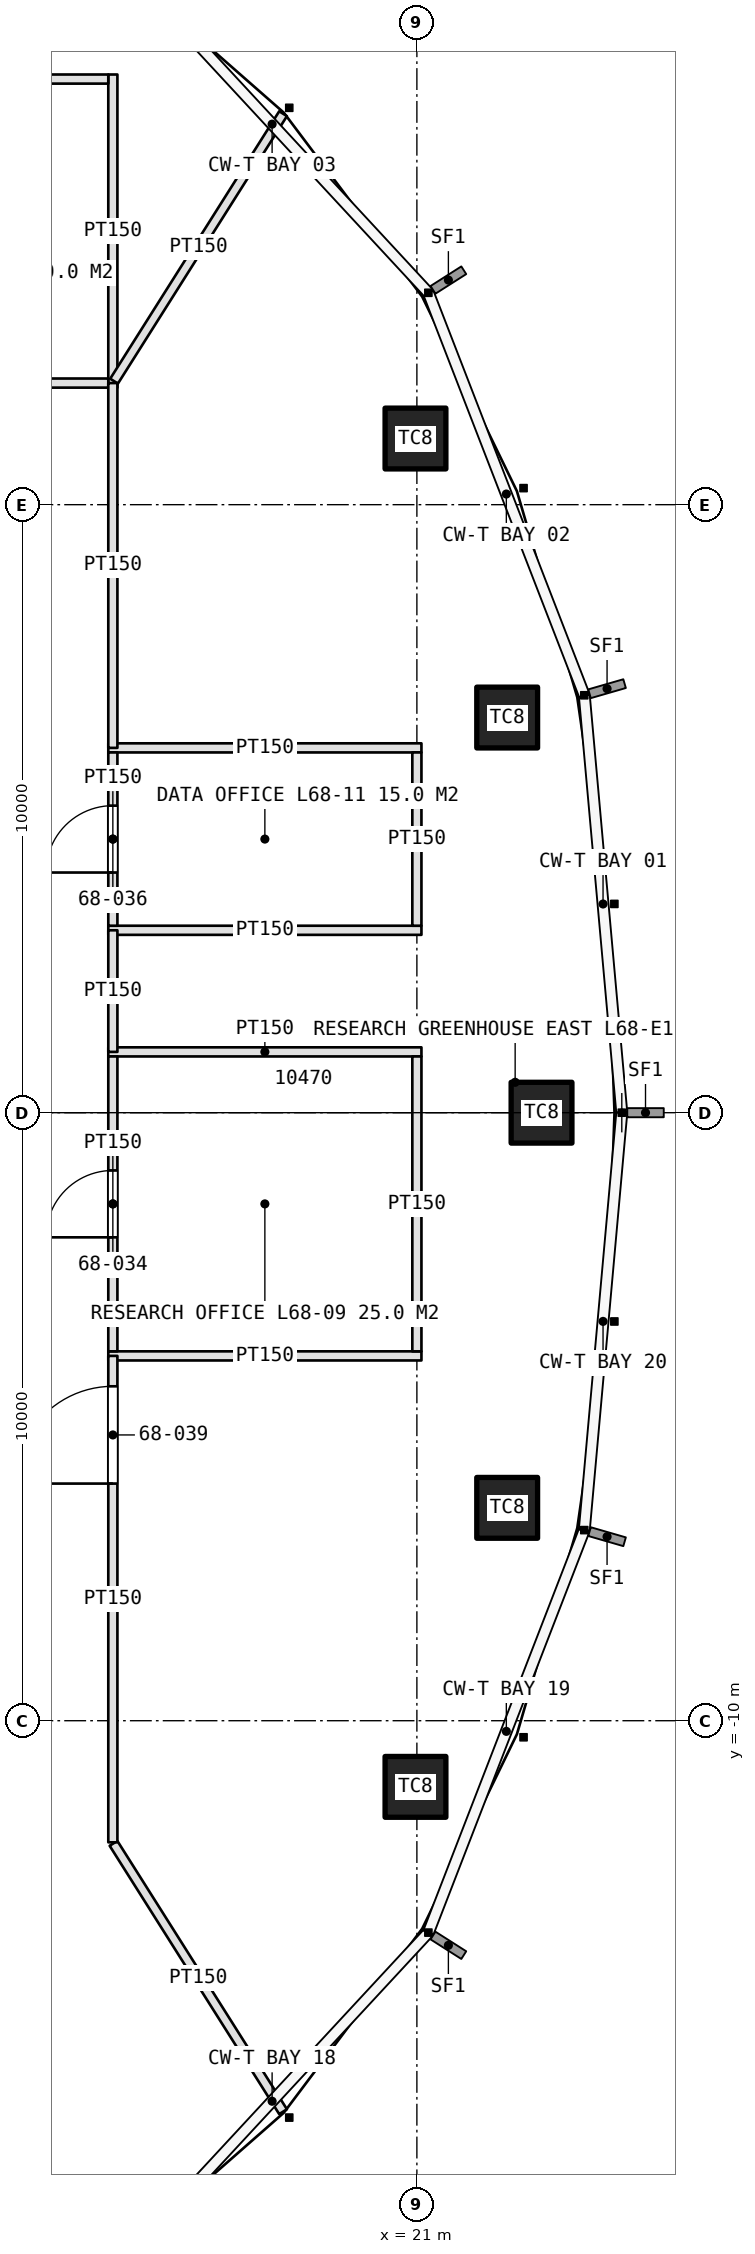
"""IFC4 building model, lengths in metres.
Left out: names, types, materials, properties, quantities, classifications, styles, units other than length and angle.
Written with IfcOpenShell. Run it as: python <this file> out.ifc"""

import sys

from ifc_helpers import new_model, si_unit, direction, frame, frame_2d, origin, origin_2d, place, context, subcontext, project, spatial, rectangle, extrude, element, fill, save


model = new_model("IFC4")
c1 = context("Model", 3, precision=1e-05, world=origin(), true_north=direction((0.0, 1.0)))
c2 = subcontext(c1, "Body", "Model", "MODEL_VIEW")
j1 = project(units=[si_unit("LENGTHUNIT", "METRE"), si_unit("PLANEANGLEUNIT", "RADIAN")], contexts=[c1])
p1 = place(None, origin())
s1 = spatial("IfcSite", under=j1, at=p1, CompositionType="ELEMENT")
p2 = place(p1, origin())
s2 = spatial("IfcBuilding", under=s1, at=p2, CompositionType="ELEMENT")
p3 = place(p2, frame((0.0, 0.0, 304.8)))
s3 = spatial("IfcBuildingStorey", under=s2, at=p3, CompositionType="ELEMENT", Elevation=304.8)
for number, where, z_axis, x_axis in (
    (1, (23.05, 0.0, 0.0), (0.0, 0.0, 1.0), (1.0, 0.0, 0.0)),
    (2, (22.485, 6.499, 0.0), (0.0, 0.0, 1.0), (1.0, 0.0, 0.0)),
    (3, (20.977, 11.088, 0.0), (0.0, 0.0, 1.0), (1.0, 0.0, 0.0)),
    (4, (20.977, -11.088, 0.0), (0.0, 0.0, 1.0), (1.0, 0.0, 0.0)),
    (5, (22.485, -6.499, 0.0), (0.0, 0.0, 1.0), (1.0, 0.0, 0.0)),
):
    element("IfcColumn", number, at=place(p3, frame(where, z_axis=z_axis, x_axis=x_axis)), inside=s3, PredefinedType="COLUMN", context=c2, shape_type="SweptSolid", body=[
        extrude(rectangle(XDim=1.0, YDim=1.0, at=origin_2d()), origin(), (0.0, 0.0, 1.0), 4.2),
    ])
p4 = place(p3, frame((16.0, 11.925, 0.0), z_axis=(0.0, 0.0, 1.0), x_axis=(0.0, 1.0, 0.0)))
e6 = element("IfcWall", 6, at=p4, inside=s3, PredefinedType="PARTITIONING", context=c2, shape_type="SweptSolid", body=[
    extrude(rectangle(XDim=5.15, YDim=0.15, at=frame_2d((2.575, 0.0))), origin(), (0.0, 0.0, 1.0), 3.0),
])
p5 = place(p3, frame((12.1, 12.0, 0.0), z_axis=(0.0, 0.0, 1.0), x_axis=(1.0, 0.0, 0.0)))
e7 = element("IfcWall", 7, at=p5, inside=s3, PredefinedType="PARTITIONING", context=c2, shape_type="SweptSolid", body=[
    extrude(rectangle(XDim=3.825, YDim=0.15, at=frame_2d((1.913, 0.0))), origin(), (0.0, 0.0, 1.0), 3.0),
])
p6 = place(p5, frame((1.363, 0.0, 0.0)))
e8 = element("IfcOpeningElement", 8, at=p6, cuts=e7, PredefinedType="OPENING", context=c2, shape_type="SweptSolid", body=[
    extrude(rectangle(XDim=1.1, YDim=2.3, at=frame_2d((0.55, 1.15))), frame((0.0, 0.085, 0.0), z_axis=(0.0, -1.0, 0.0), x_axis=(1.0, 0.0, 0.0)), (0.0, 0.0, 1.0), 0.17),
])
p7 = place(p3, frame((12.1, 17.0, 0.0), z_axis=(0.0, 0.0, 1.0), x_axis=(1.0, 0.0, 0.0)))
e9 = element("IfcWall", 9, at=p7, inside=s3, PredefinedType="PARTITIONING", context=c2, shape_type="SweptSolid", body=[
    extrude(rectangle(XDim=3.825, YDim=0.15, at=frame_2d((1.913, 0.0))), origin(), (0.0, 0.0, 1.0), 3.0),
])
for number, where, z_axis, x_axis in (
    (10, (15.925, -4.0, 0.0), (0.0, 0.0, 1.0), (1.0, 0.0, 0.0)),
    (11, (15.925, 1.0, 0.0), (0.0, 0.0, 1.0), (1.0, 0.0, 0.0)),
):
    element("IfcWall", number, at=place(p3, frame(where, z_axis=z_axis, x_axis=x_axis)), inside=s3, PredefinedType="PARTITIONING", context=c2, shape_type="SweptSolid", body=[
        extrude(rectangle(XDim=5.15, YDim=0.15, at=frame_2d((2.575, 0.0))), origin(), (0.0, 0.0, 1.0), 3.0),
    ])
p8 = place(p3, frame((16.0, -3.925, 0.0), z_axis=(0.0, 0.0, 1.0), x_axis=(0.0, 1.0, 0.0)))
e12 = element("IfcWall", 12, at=p8, inside=s3, PredefinedType="PARTITIONING", context=c2, shape_type="SweptSolid", body=[
    extrude(rectangle(XDim=4.85, YDim=0.15, at=frame_2d((2.425, 0.0))), origin(), (0.0, 0.0, 1.0), 3.0),
])
p9 = place(p8, frame((1.875, 0.0, 0.0)))
e13 = element("IfcOpeningElement", 13, at=p9, cuts=e12, PredefinedType="OPENING", context=c2, shape_type="SweptSolid", body=[
    extrude(rectangle(XDim=1.1, YDim=2.3, at=frame_2d((0.55, 1.15))), frame((0.0, 0.085, 0.0), z_axis=(0.0, -1.0, 0.0), x_axis=(1.0, 0.0, 0.0)), (0.0, 0.0, 1.0), 0.17),
])
p10 = place(p3, frame((21.0, -3.925, 0.0), z_axis=(0.0, 0.0, 1.0), x_axis=(0.0, 1.0, 0.0)))
e14 = element("IfcWall", 14, at=p10, inside=s3, PredefinedType="PARTITIONING", context=c2, shape_type="SweptSolid", body=[
    extrude(rectangle(XDim=4.85, YDim=0.15, at=frame_2d((2.425, 0.0))), origin(), (0.0, 0.0, 1.0), 3.0),
])
for number, where, z_axis, x_axis in (
    (15, (15.925, 3.0, 0.0), (0.0, 0.0, 1.0), (1.0, 0.0, 0.0)),
    (16, (15.925, 6.0, 0.0), (0.0, 0.0, 1.0), (1.0, 0.0, 0.0)),
):
    element("IfcWall", number, at=place(p3, frame(where, z_axis=z_axis, x_axis=x_axis)), inside=s3, PredefinedType="PARTITIONING", context=c2, shape_type="SweptSolid", body=[
        extrude(rectangle(XDim=5.15, YDim=0.15, at=frame_2d((2.575, 0.0))), origin(), (0.0, 0.0, 1.0), 3.0),
    ])
p11 = place(p3, frame((16.0, 3.075, 0.0), z_axis=(0.0, 0.0, 1.0), x_axis=(0.0, 1.0, 0.0)))
e17 = element("IfcWall", 17, at=p11, inside=s3, PredefinedType="PARTITIONING", context=c2, shape_type="SweptSolid", body=[
    extrude(rectangle(XDim=2.85, YDim=0.15, at=frame_2d((1.425, 0.0))), origin(), (0.0, 0.0, 1.0), 3.0),
])
p12 = place(p11, frame((0.875, 0.0, 0.0)))
e18 = element("IfcOpeningElement", 18, at=p12, cuts=e17, PredefinedType="OPENING", context=c2, shape_type="SweptSolid", body=[
    extrude(rectangle(XDim=1.1, YDim=2.3, at=frame_2d((0.55, 1.15))), frame((0.0, 0.085, 0.0), z_axis=(0.0, -1.0, 0.0), x_axis=(1.0, 0.0, 0.0)), (0.0, 0.0, 1.0), 0.17),
])
p13 = place(p3, frame((21.0, 3.075, 0.0), z_axis=(0.0, 0.0, 1.0), x_axis=(0.0, 1.0, 0.0)))
e19 = element("IfcWall", 19, at=p13, inside=s3, PredefinedType="PARTITIONING", context=c2, shape_type="SweptSolid", body=[
    extrude(rectangle(XDim=2.85, YDim=0.15, at=frame_2d((1.425, 0.0))), origin(), (0.0, 0.0, 1.0), 3.0),
])
p14 = place(p3, frame((16.011, -12.017, 0.0), z_axis=(0.0, 0.0, 1.0), x_axis=(0.53415837449, -0.845384427916, 0.0)))
e20 = element("IfcWall", 20, at=p14, inside=s3, PredefinedType="PARTITIONING", context=c2, shape_type="SweptSolid", body=[
    extrude(rectangle(XDim=5.22, YDim=0.15, at=frame_2d((2.61, 0.0))), origin(), (0.0, 0.0, 1.0), 3.0),
])
p15 = place(p3, frame((16.02, 12.032, 0.0), z_axis=(0.0, 0.0, 1.0), x_axis=(0.534176584227, 0.845372921771, 0.0)))
e21 = element("IfcWall", 21, at=p15, inside=s3, PredefinedType="PARTITIONING", context=c2, shape_type="SweptSolid", body=[
    extrude(rectangle(XDim=5.203, YDim=0.15, at=frame_2d((2.602, 0.0))), origin(), (0.0, 0.0, 1.0), 3.0),
])
p16 = place(p3, frame((16.0, -12.0, 0.0), z_axis=(0.0, 0.0, 1.0), x_axis=(0.0, 1.0, 0.0)))
e22 = element("IfcWall", 22, at=p16, inside=s3, PredefinedType="PARTITIONING", context=c2, shape_type="SweptSolid", body=[
    extrude(rectangle(XDim=8.0, YDim=0.15, at=frame_2d((4.0, 0.0))), origin(), (0.0, 0.0, 1.0), 3.0),
])
p17 = place(p16, frame((5.9, 0.0, 0.0)))
e23 = element("IfcOpeningElement", 23, at=p17, cuts=e22, PredefinedType="OPENING", context=c2, shape_type="SweptSolid", body=[
    extrude(rectangle(XDim=1.6, YDim=2.4, at=frame_2d((0.8, 1.2))), frame((0.0, 0.085, 0.0), z_axis=(0.0, -1.0, 0.0), x_axis=(1.0, 0.0, 0.0)), (0.0, 0.0, 1.0), 0.17),
])
p18 = place(p3, frame((16.0, 1.0, 0.0), z_axis=(0.0, 0.0, 1.0), x_axis=(0.0, 1.0, 0.0)))
e24 = element("IfcWall", 24, at=p18, inside=s3, PredefinedType="PARTITIONING", context=c2, shape_type="SweptSolid", body=[
    extrude(rectangle(XDim=2.0, YDim=0.15, at=frame_2d((1.0, 0.0))), origin(), (0.0, 0.0, 1.0), 3.0),
])
p19 = place(p3, frame((16.0, 6.0, 0.0), z_axis=(0.0, 0.0, 1.0), x_axis=(0.0, 1.0, 0.0)))
e25 = element("IfcWall", 25, at=p19, inside=s3, PredefinedType="PARTITIONING", context=c2, shape_type="SweptSolid", body=[
    extrude(rectangle(XDim=6.0, YDim=0.15, at=frame_2d((3.0, 0.0))), origin(), (0.0, 0.0, 1.0), 3.0),
])
p20 = place(p9, origin())
e26 = element("IfcDoor", 26, at=p20, inside=s3, OperationType="SINGLE_SWING_LEFT", PredefinedType="DOOR", context=c2, shape_type="SweptSolid", body=[
    extrude(rectangle(XDim=1.1, YDim=2.3, at=frame_2d((0.55, 1.15))), frame((0.0, 0.025, 0.0), z_axis=(0.0, -1.0, 0.0), x_axis=(1.0, 0.0, 0.0)), (0.0, 0.0, 1.0), 0.05),
])
fill(e13, e26)
p21 = place(p12, origin())
e27 = element("IfcDoor", 27, at=p21, inside=s3, OperationType="SINGLE_SWING_LEFT", PredefinedType="DOOR", context=c2, shape_type="SweptSolid", body=[
    extrude(rectangle(XDim=1.1, YDim=2.3, at=frame_2d((0.55, 1.15))), frame((0.0, 0.025, 0.0), z_axis=(0.0, -1.0, 0.0), x_axis=(1.0, 0.0, 0.0)), (0.0, 0.0, 1.0), 0.05),
])
fill(e18, e27)
p22 = place(p17, origin())
e28 = element("IfcDoor", 28, at=p22, inside=s3, OperationType="DOUBLE_DOOR_SINGLE_SWING", PredefinedType="DOOR", context=c2, shape_type="SweptSolid", body=[
    extrude(rectangle(XDim=1.6, YDim=2.4, at=frame_2d((0.8, 1.2))), frame((0.0, 0.025, 0.0), z_axis=(0.0, -1.0, 0.0), x_axis=(1.0, 0.0, 0.0)), (0.0, 0.0, 1.0), 0.05),
])
fill(e23, e28)
save(model, sys.argv[1])
